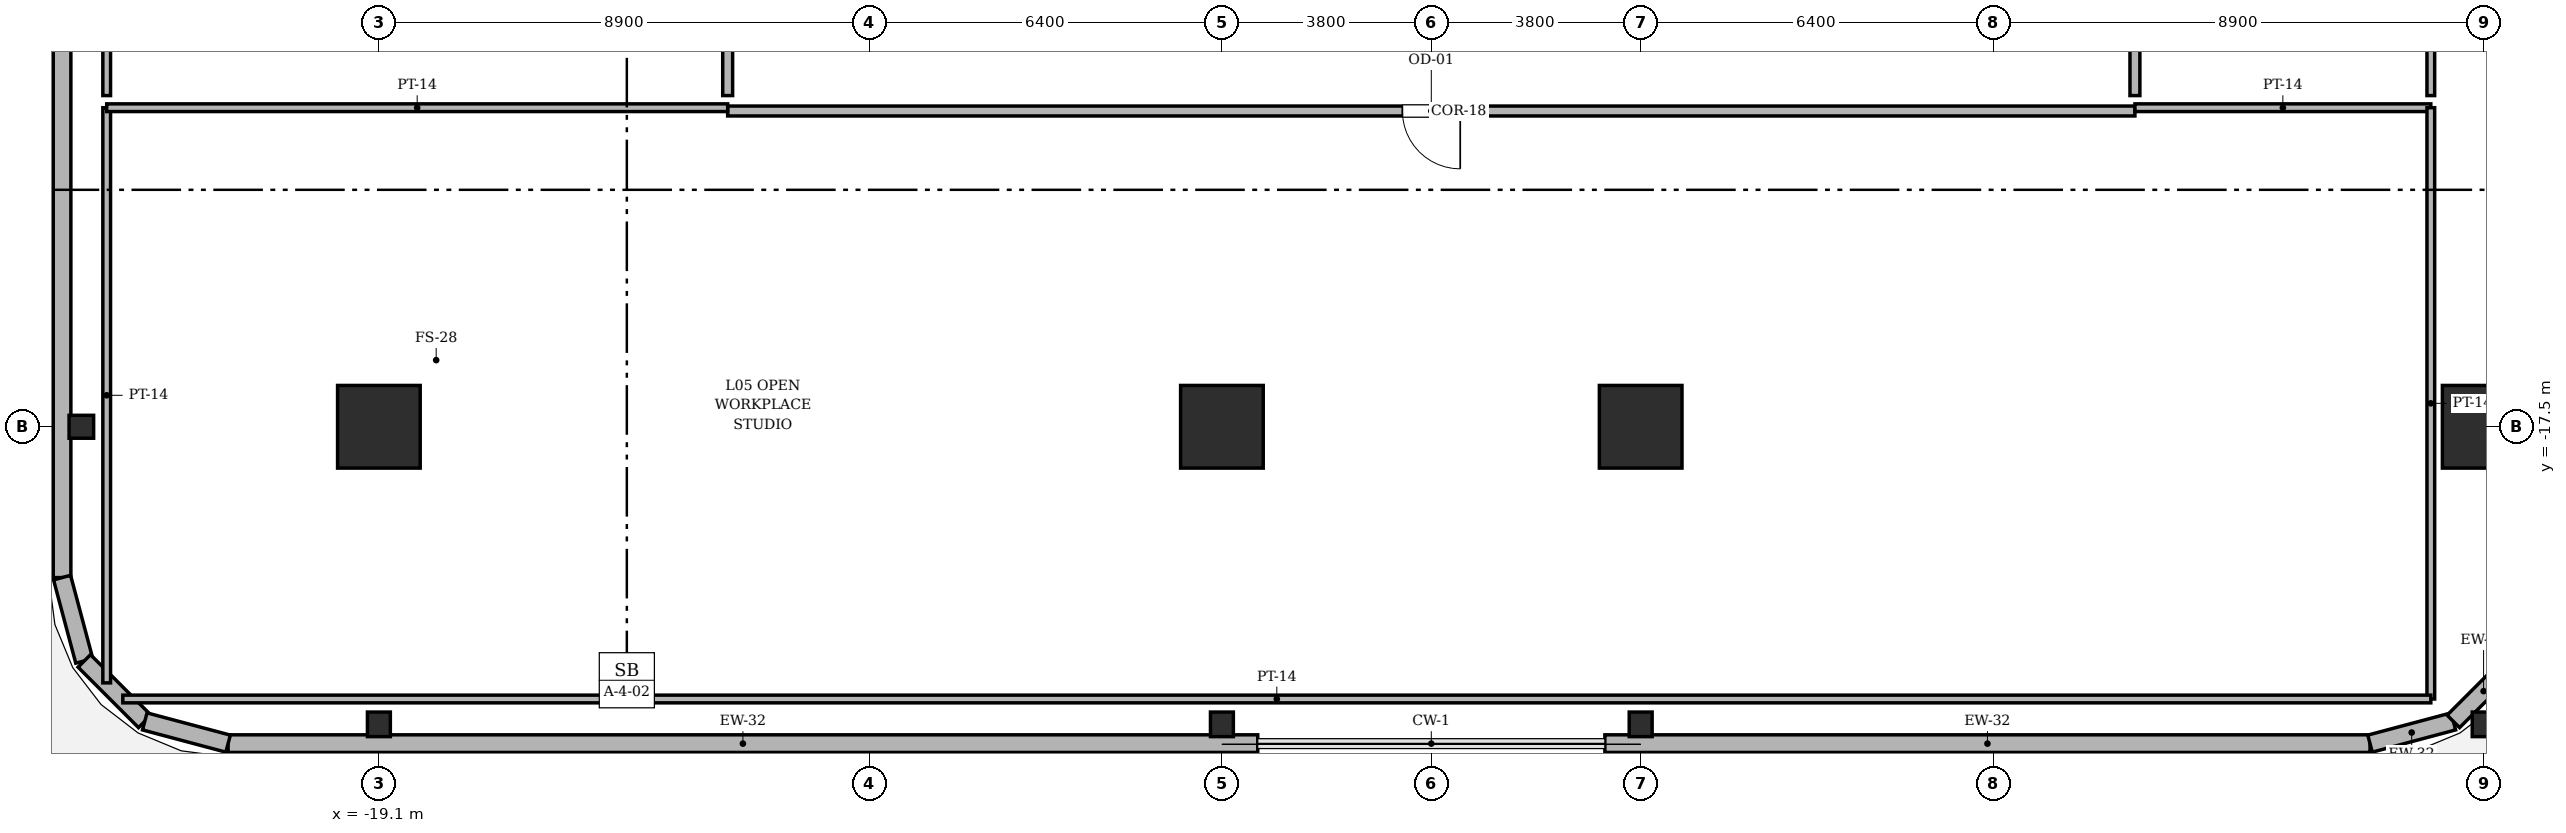
"""IFC4 building model, lengths in metres.
Left out: names, types, materials, properties, quantities, classifications, styles, units other than length and angle.
Written with IfcOpenShell. Run it as: python <this file> out.ifc"""

import sys

from ifc_helpers import new_model, si_unit, direction, frame, frame_2d, origin, origin_2d, place, context, subcontext, project, spatial, rectangle, hollow_rectangle, i_section, extrude, element, fill, save


model = new_model("IFC4")
c1 = context("Model", 3, precision=1e-05, world=origin(), true_north=direction((0.0, 1.0)))
c2 = subcontext(c1, "Body", "Model", "MODEL_VIEW")
j1 = project(units=[si_unit("LENGTHUNIT", "METRE"), si_unit("PLANEANGLEUNIT", "RADIAN")], contexts=[c1])
p1 = place(None, origin())
s1 = spatial("IfcSite", under=j1, at=p1, CompositionType="ELEMENT")
p2 = place(p1, origin())
s2 = spatial("IfcBuilding", under=s1, at=p2, CompositionType="ELEMENT")
p3 = place(p2, frame((0.0, 0.0, 28.2)))
s3 = spatial("IfcBuildingStorey", under=s2, at=p3, CompositionType="ELEMENT", Elevation=28.2)
for number, where, z_axis, x_axis in (
    (1, (-19.1, -17.5, 0.0), (0.0, 0.0, 1.0), (1.0, 0.0, 0.0)),
    (2, (-3.8, -17.5, 0.0), (0.0, 0.0, 1.0), (1.0, 0.0, 0.0)),
    (3, (3.8, -17.5, 0.0), (0.0, 0.0, 1.0), (1.0, 0.0, 0.0)),
    (4, (19.1, -17.5, 0.0), (0.0, 0.0, 1.0), (1.0, 0.0, 0.0)),
):
    element("IfcColumn", number, at=place(p3, frame(where, z_axis=z_axis, x_axis=x_axis)), inside=s3, PredefinedType="COLUMN", context=c2, shape_type="SweptSolid", body=[
        extrude(hollow_rectangle(XDim=1.5, YDim=1.5, WallThickness=0.045, at=origin_2d()), origin(), (0.0, 0.0, 1.0), 4.05),
    ])
for number, where, z_axis, x_axis in (
    (5, (-19.1, -22.9, 0.0), (0.0, 0.0, 1.0), (1.0, 0.0, 0.0)),
    (6, (-3.8, -22.9, 0.0), (0.0, 0.0, 1.0), (1.0, 0.0, 0.0)),
    (7, (3.8, -22.9, 0.0), (0.0, 0.0, 1.0), (1.0, 0.0, 0.0)),
    (8, (19.1, -22.9, 0.0), (0.0, 0.0, 1.0), (1.0, 0.0, 0.0)),
    (9, (-24.5, -17.5, 0.0), (0.0, 0.0, 1.0), (0.0, 1.0, 0.0)),
):
    element("IfcColumn", number, at=place(p3, frame(where, z_axis=z_axis, x_axis=x_axis)), inside=s3, PredefinedType="COLUMN", context=c2, shape_type="SweptSolid", body=[
        extrude(i_section(OverallWidth=0.416, OverallDepth=0.446, WebThickness=0.039, FlangeThickness=0.062, FilletRadius=0.018, at=origin_2d()), origin(), (0.0, 0.0, 1.0), 4.048),
    ])
p4 = place(p3, frame((-21.837, -23.25, 0.0), z_axis=(0.0, 0.0, 1.0), x_axis=(1.0, 0.0, 0.0)))
e10 = element("IfcWall", 10, at=p4, inside=s3, PredefinedType="SOLIDWALL", context=c2, shape_type="SweptSolid", body=[
    extrude(rectangle(XDim=18.687, YDim=0.32, at=frame_2d((9.344, 0.0))), origin(), (0.0, 0.0, 1.0), 2.524),
])
p5 = place(p3, frame((3.15, -23.25, 0.0), z_axis=(0.0, 0.0, 1.0), x_axis=(1.0, 0.0, 0.0)))
e11 = element("IfcWall", 11, at=p5, inside=s3, PredefinedType="SOLIDWALL", context=c2, shape_type="SweptSolid", body=[
    extrude(rectangle(XDim=13.887, YDim=0.32, at=frame_2d((6.943, 0.0))), origin(), (0.0, 0.0, 1.0), 2.524),
])
p6 = place(p3, frame((17.037, -23.25, 0.0), z_axis=(0.0, 0.0, 1.0), x_axis=(0.966224582397, 0.257701486942, 0.0)))
e12 = element("IfcWall", 12, at=p6, inside=s3, PredefinedType="SOLIDWALL", context=c2, shape_type="SweptSolid", body=[
    extrude(rectangle(XDim=1.565, YDim=0.32, at=frame_2d((0.783, 0.0))), origin(), (0.0, 0.0, 1.0), 2.524),
])
p7 = place(p3, frame((18.549, -22.847, 0.0), z_axis=(0.0, 0.0, 1.0), x_axis=(0.707028130747, 0.707185422879, 0.0)))
e13 = element("IfcWall", 13, at=p7, inside=s3, PredefinedType="SOLIDWALL", context=c2, shape_type="SweptSolid", body=[
    extrude(rectangle(XDim=1.552, YDim=0.32, at=frame_2d((0.776, 0.0))), origin(), (0.0, 0.0, 1.0), 2.484),
])
p8 = place(p3, frame((-24.85, -2.75, 0.0), z_axis=(0.0, 0.0, 1.0), x_axis=(0.0, -1.0, 0.0)))
e14 = element("IfcWall", 14, at=p8, inside=s3, PredefinedType="SOLIDWALL", context=c2, shape_type="SweptSolid", body=[
    extrude(rectangle(XDim=17.487, YDim=0.32, at=frame_2d((8.743, 0.0))), origin(), (0.0, 0.0, 1.0), 2.524),
])
p9 = place(p3, frame((-24.85, -20.237, 0.0), z_axis=(0.0, 0.0, 1.0), x_axis=(0.257847112249, -0.966185730957, 0.0)))
e15 = element("IfcWall", 15, at=p9, inside=s3, PredefinedType="SOLIDWALL", context=c2, shape_type="SweptSolid", body=[
    extrude(rectangle(XDim=1.565, YDim=0.32, at=frame_2d((0.783, 0.0))), origin(), (0.0, 0.0, 1.0), 3.81),
])
p10 = place(p3, frame((-24.447, -21.749, 0.0), z_axis=(0.0, 0.0, 1.0), x_axis=(0.707028130747, -0.707185422879, 0.0)))
e16 = element("IfcWall", 16, at=p10, inside=s3, PredefinedType="SOLIDWALL", context=c2, shape_type="SweptSolid", body=[
    extrude(rectangle(XDim=1.552, YDim=0.32, at=frame_2d((0.776, 0.0))), origin(), (0.0, 0.0, 1.0), 3.81),
])
p11 = place(p3, frame((-23.349, -22.847, 0.0), z_axis=(0.0, 0.0, 1.0), x_axis=(0.966224582397, -0.257701486942, 0.0)))
e17 = element("IfcWall", 17, at=p11, inside=s3, PredefinedType="SOLIDWALL", context=c2, shape_type="SweptSolid", body=[
    extrude(rectangle(XDim=1.565, YDim=0.32, at=frame_2d((0.783, 0.0))), origin(), (0.0, 0.0, 1.0), 3.81),
])
p12 = place(p3, frame((-12.77, -11.77, 0.0), z_axis=(0.0, 0.0, 1.0), x_axis=(1.0, 0.0, 0.0)))
e18 = element("IfcWall", 18, at=p12, inside=s3, PredefinedType="PARTITIONING", context=c2, shape_type="SweptSolid", body=[
    extrude(rectangle(XDim=25.54, YDim=0.18, at=frame_2d((12.77, 0.0))), origin(), (0.0, 0.0, 1.0), 3.104),
])
p13 = place(p12, frame((12.245, 0.0, 0.0)))
e19 = element("IfcOpeningElement", 19, at=p13, cuts=e18, PredefinedType="OPENING", context=c2, shape_type="SweptSolid", body=[
    extrude(rectangle(XDim=1.05, YDim=2.2, at=frame_2d((0.525, 1.1))), frame((0.0, 0.1, 0.0), z_axis=(0.0, -1.0, 0.0), x_axis=(1.0, 0.0, 0.0)), (0.0, 0.0, 1.0), 0.2),
])
p14 = place(p3, frame((12.77, -11.71, 0.0), z_axis=(0.0, 0.0, 1.0), x_axis=(1.0, 0.0, 0.0)))
e20 = element("IfcWall", 20, at=p14, inside=s3, PredefinedType="PARTITIONING", context=c2, shape_type="SweptSolid", body=[
    extrude(rectangle(XDim=5.37, YDim=0.14, at=frame_2d((2.685, 0.0))), origin(), (0.0, 0.0, 1.0), 3.354),
])
p15 = place(p3, frame((18.14, -11.71, 0.0), z_axis=(0.0, 0.0, 1.0), x_axis=(0.0, -1.0, 0.0)))
e21 = element("IfcWall", 21, at=p15, inside=s3, PredefinedType="PARTITIONING", context=c2, shape_type="SweptSolid", body=[
    extrude(rectangle(XDim=10.73, YDim=0.14, at=frame_2d((5.365, 0.0))), origin(), (0.0, 0.0, 1.0), 3.104),
])
p16 = place(p3, frame((18.14, -22.44, 0.0), z_axis=(0.0, 0.0, 1.0), x_axis=(-1.0, 0.0, 0.0)))
e22 = element("IfcWall", 22, at=p16, inside=s3, PredefinedType="PARTITIONING", context=c2, shape_type="SweptSolid", body=[
    extrude(rectangle(XDim=41.887, YDim=0.14, at=frame_2d((20.944, 0.0))), origin(), (0.0, 0.0, 1.0), 2.484),
])
p17 = place(p3, frame((-24.04, -22.147, 0.0), z_axis=(0.0, 0.0, 1.0), x_axis=(0.0, 1.0, 0.0)))
e23 = element("IfcWall", 23, at=p17, inside=s3, PredefinedType="PARTITIONING", context=c2, shape_type="SweptSolid", body=[
    extrude(rectangle(XDim=10.438, YDim=0.14, at=frame_2d((5.219, 0.0))), origin(), (0.0, 0.0, 1.0), 2.484),
])
p18 = place(p3, frame((-24.04, -11.71, 0.0), z_axis=(0.0, 0.0, 1.0), x_axis=(1.0, 0.0, 0.0)))
e24 = element("IfcWall", 24, at=p18, inside=s3, PredefinedType="PARTITIONING", context=c2, shape_type="SweptSolid", body=[
    extrude(rectangle(XDim=11.27, YDim=0.14, at=frame_2d((5.635, 0.0))), origin(), (0.0, 0.0, 1.0), 3.104),
])
p19 = place(p3, frame((18.14, -1.27, 0.0), z_axis=(0.0, 0.0, 1.0), x_axis=(0.0, -1.0, 0.0)))
e25 = element("IfcWall", 25, at=p19, inside=s3, PredefinedType="PARTITIONING", context=c2, shape_type="SweptSolid", body=[
    extrude(rectangle(XDim=10.22, YDim=0.14, at=frame_2d((5.11, 0.0))), origin(), (0.0, 0.0, 1.0), 3.104),
])
p20 = place(p3, frame((12.77, -11.49, 0.0), z_axis=(0.0, 0.0, 1.0), x_axis=(0.0, 1.0, 0.0)))
e26 = element("IfcWall", 26, at=p20, inside=s3, PredefinedType="PARTITIONING", context=c2, shape_type="SweptSolid", body=[
    extrude(rectangle(XDim=10.22, YDim=0.18, at=frame_2d((5.11, 0.0))), origin(), (0.0, 0.0, 1.0), 3.104),
])
p21 = place(p3, frame((-12.77, -0.06, 0.0), z_axis=(0.0, 0.0, 1.0), x_axis=(0.0, -1.0, 0.0)))
e27 = element("IfcWall", 27, at=p21, inside=s3, PredefinedType="PARTITIONING", context=c2, shape_type="SweptSolid", body=[
    extrude(rectangle(XDim=11.43, YDim=0.18, at=frame_2d((5.715, 0.0))), origin(), (0.0, 0.0, 1.0), 3.104),
])
p22 = place(p21, frame((5.19, 0.0, 0.0)))
e28 = element("IfcOpeningElement", 28, at=p22, cuts=e27, PredefinedType="OPENING", context=c2, shape_type="SweptSolid", body=[
    extrude(rectangle(XDim=1.05, YDim=2.2, at=frame_2d((0.525, 1.1))), frame((0.0, 0.1, 0.0), z_axis=(0.0, -1.0, 0.0), x_axis=(1.0, 0.0, 0.0)), (0.0, 0.0, 1.0), 0.2),
])
p23 = place(p3, frame((-24.04, -11.49, 0.0), z_axis=(0.0, 0.0, 1.0), x_axis=(0.0, 1.0, 0.0)))
e29 = element("IfcWall", 29, at=p23, inside=s3, PredefinedType="PARTITIONING", context=c2, shape_type="SweptSolid", body=[
    extrude(rectangle(XDim=11.43, YDim=0.14, at=frame_2d((5.715, 0.0))), origin(), (0.0, 0.0, 1.0), 2.484),
])
p24 = place(p13, origin())
e30 = element("IfcDoor", 30, at=p24, inside=s3, OperationType="SINGLE_SWING_RIGHT", PredefinedType="DOOR", context=c2, shape_type="SweptSolid", body=[
    extrude(rectangle(XDim=1.05, YDim=2.2, at=frame_2d((0.525, 1.1))), frame((0.0, 0.025, 0.0), z_axis=(0.0, -1.0, 0.0), x_axis=(1.0, 0.0, 0.0)), (0.0, 0.0, 1.0), 0.05),
])
fill(e19, e30)
save(model, sys.argv[1])
